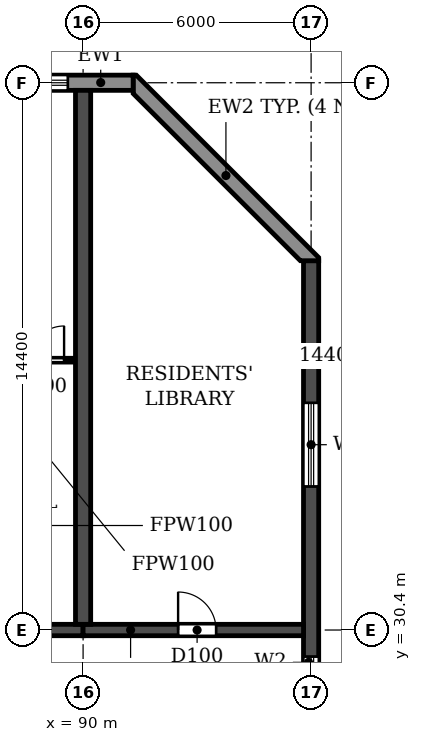
"""IFC4 building model, lengths in metres.
Left out: names, types, materials, properties, quantities, classifications, styles, units other than length and angle.
Written with IfcOpenShell. Run it as: python <this file> out.ifc"""

import sys

from ifc_helpers import new_model, si_unit, direction, frame, frame_2d, origin, place, context, subcontext, project, spatial, polyline, rectangle, outline, extrude, element, fill, save


model = new_model("IFC4")
c1 = context("Model", 3, precision=1e-05, world=origin(), true_north=direction((0.0, 1.0)))
c2 = subcontext(c1, "Body", "Model", "MODEL_VIEW")
j1 = project(units=[si_unit("LENGTHUNIT", "METRE"), si_unit("PLANEANGLEUNIT", "RADIAN")], contexts=[c1])
p1 = place(None, origin())
s1 = spatial("IfcSite", under=j1, at=p1, CompositionType="ELEMENT")
p2 = place(p1, origin())
s2 = spatial("IfcBuilding", under=s1, at=p2, CompositionType="ELEMENT")
p3 = place(p2, frame((0.0, 0.0, 56.4)))
s3 = spatial("IfcBuildingStorey", under=s2, at=p3, CompositionType="ELEMENT", Elevation=56.4)
p4 = place(p3, frame((90.0, 30.55, 0.0), z_axis=(0.0, 0.0, 1.0), x_axis=(0.0, 1.0, 0.0)))
e1 = element("IfcWall", 1, at=p4, inside=s3, PredefinedType="SHEAR", context=c2, shape_type="SweptSolid", body=[
    extrude(rectangle(XDim=14.05, YDim=0.4, at=frame_2d((7.025, 0.0))), origin(), (0.0, 0.0, 1.0), 3.05),
])
p5 = place(p3, frame((96.0, 4.683, 0.0), z_axis=(0.0, 0.0, 1.0), x_axis=(0.0, 1.0, 0.0)))
e2 = element("IfcWall", 2, at=p5, inside=s3, PredefinedType="SHEAR", context=c2, shape_type="SweptSolid", body=[
    extrude(rectangle(XDim=35.434, YDim=0.4, at=frame_2d((17.717, 0.0))), origin(), (0.0, 0.0, 1.0), 3.05),
])
p6 = place(p5, frame((15.917, 0.0, 0.9)))
e3 = element("IfcOpeningElement", 3, at=p6, cuts=e2, PredefinedType="OPENING", context=c2, shape_type="SweptSolid", body=[
    extrude(rectangle(XDim=1.2, YDim=1.5, at=frame_2d((0.6, 0.75))), frame((0.0, 0.21, 0.0), z_axis=(0.0, -1.0, 0.0), x_axis=(1.0, 0.0, 0.0)), (0.0, 0.0, 1.0), 0.42),
])
p7 = place(p5, frame((23.817, 0.0, 0.9)))
e4 = element("IfcOpeningElement", 4, at=p7, cuts=e2, PredefinedType="OPENING", context=c2, shape_type="SweptSolid", body=[
    extrude(rectangle(XDim=1.2, YDim=1.5, at=frame_2d((0.6, 0.75))), frame((0.0, 0.21, 0.0), z_axis=(0.0, -1.0, 0.0), x_axis=(1.0, 0.0, 0.0)), (0.0, 0.0, 1.0), 0.42),
])
p8 = place(p5, frame((8.017, 0.0, 0.9)))
e5 = element("IfcOpeningElement", 5, at=p8, cuts=e2, PredefinedType="OPENING", context=c2, shape_type="SweptSolid", body=[
    extrude(rectangle(XDim=1.2, YDim=1.5, at=frame_2d((0.6, 0.75))), frame((0.0, 0.21, 0.0), z_axis=(0.0, -1.0, 0.0), x_axis=(1.0, 0.0, 0.0)), (0.0, 0.0, 1.0), 0.42),
])
p9 = place(p5, frame((29.493, 0.0, 0.6)))
e6 = element("IfcOpeningElement", 6, at=p9, cuts=e2, PredefinedType="OPENING", context=c2, shape_type="SweptSolid", body=[
    extrude(rectangle(XDim=2.2, YDim=1.8, at=frame_2d((1.1, 0.9))), frame((0.0, 0.21, 0.0), z_axis=(0.0, -1.0, 0.0), x_axis=(1.0, 0.0, 0.0)), (0.0, 0.0, 1.0), 0.42),
])
p10 = place(p5, frame((2.541, 0.0, 0.6)))
e7 = element("IfcOpeningElement", 7, at=p10, cuts=e2, PredefinedType="OPENING", context=c2, shape_type="SweptSolid", body=[
    extrude(rectangle(XDim=2.2, YDim=1.8, at=frame_2d((1.1, 0.9))), frame((0.0, 0.21, 0.0), z_axis=(0.0, -1.0, 0.0), x_axis=(1.0, 0.0, 0.0)), (0.0, 0.0, 1.0), 0.42),
])
p11 = place(p3, frame((84.0, 30.4, 0.0), z_axis=(0.0, 0.0, 1.0), x_axis=(1.0, 0.0, 0.0)))
e8 = element("IfcWall", 8, at=p11, inside=s3, PredefinedType="SHEAR", context=c2, shape_type="SweptSolid", body=[
    extrude(rectangle(XDim=6.0, YDim=0.3, at=frame_2d((3.0, 0.0))), origin(), (0.0, 0.0, 1.0), 2.45),
])
p12 = place(p3, frame((90.0, 30.4, 0.0), z_axis=(0.0, 0.0, 1.0), x_axis=(1.0, 0.0, 0.0)))
e9 = element("IfcWall", 9, at=p12, inside=s3, PredefinedType="SHEAR", context=c2, shape_type="SweptSolid", body=[
    extrude(rectangle(XDim=5.8, YDim=0.3, at=frame_2d((2.9, 0.0))), origin(), (0.0, 0.0, 1.0), 2.45),
])
p13 = place(p12, frame((2.5, 0.0, 0.0)))
e10 = element("IfcOpeningElement", 10, at=p13, cuts=e9, PredefinedType="OPENING", context=c2, shape_type="SweptSolid", body=[
    extrude(rectangle(XDim=1.0, YDim=2.1, at=frame_2d((0.5, 1.05))), frame((0.0, 0.16, 0.0), z_axis=(0.0, -1.0, 0.0), x_axis=(1.0, 0.0, 0.0)), (0.0, 0.0, 1.0), 0.32),
])
p14 = place(p3, origin())
e11 = element("IfcWall", 11, at=p14, inside=s3, PredefinedType="STANDARD", context=c2, shape_type="SweptSolid", body=[
    extrude(outline(polyline([(96.2, 40.117), (96.2, 40.2), (91.4, 45.0), (91.317, 45.0), (91.317, 44.517), (95.717, 40.117), (96.2, 40.117)])), origin(), (0.0, 0.0, 1.0), 3.05),
])
p15 = place(p3, frame((91.317, 44.8, 0.0), z_axis=(0.0, 0.0, 1.0), x_axis=(-1.0, 0.0, 0.0)))
e12 = element("IfcWall", 12, at=p15, inside=s3, PredefinedType="STANDARD", context=c2, shape_type="SweptSolid", body=[
    extrude(rectangle(XDim=80.634, YDim=0.4, at=frame_2d((40.317, 0.0))), origin(), (0.0, 0.0, 1.0), 3.05),
])
p16 = place(p15, frame((76.717, 0.0, 0.9)))
e13 = element("IfcOpeningElement", 13, at=p16, cuts=e12, PredefinedType="OPENING", context=c2, shape_type="SweptSolid", body=[
    extrude(rectangle(XDim=2.2, YDim=1.5, at=frame_2d((1.1, 0.75))), frame((0.0, 0.21, 0.0), z_axis=(0.0, -1.0, 0.0), x_axis=(1.0, 0.0, 0.0)), (0.0, 0.0, 1.0), 0.42),
])
p17 = place(p15, frame((73.917, 0.0, 0.0)))
e14 = element("IfcOpeningElement", 14, at=p17, cuts=e12, PredefinedType="OPENING", context=c2, shape_type="SweptSolid", body=[
    extrude(rectangle(XDim=1.8, YDim=2.4, at=frame_2d((0.9, 1.2))), frame((0.0, 0.21, 0.0), z_axis=(0.0, -1.0, 0.0), x_axis=(1.0, 0.0, 0.0)), (0.0, 0.0, 1.0), 0.42),
])
p18 = place(p15, frame((70.717, 0.0, 0.9)))
e15 = element("IfcOpeningElement", 15, at=p18, cuts=e12, PredefinedType="OPENING", context=c2, shape_type="SweptSolid", body=[
    extrude(rectangle(XDim=2.2, YDim=1.5, at=frame_2d((1.1, 0.75))), frame((0.0, 0.21, 0.0), z_axis=(0.0, -1.0, 0.0), x_axis=(1.0, 0.0, 0.0)), (0.0, 0.0, 1.0), 0.42),
])
p19 = place(p15, frame((67.917, 0.0, 0.0)))
e16 = element("IfcOpeningElement", 16, at=p19, cuts=e12, PredefinedType="OPENING", context=c2, shape_type="SweptSolid", body=[
    extrude(rectangle(XDim=1.8, YDim=2.4, at=frame_2d((0.9, 1.2))), frame((0.0, 0.21, 0.0), z_axis=(0.0, -1.0, 0.0), x_axis=(1.0, 0.0, 0.0)), (0.0, 0.0, 1.0), 0.42),
])
p20 = place(p15, frame((64.717, 0.0, 0.9)))
e17 = element("IfcOpeningElement", 17, at=p20, cuts=e12, PredefinedType="OPENING", context=c2, shape_type="SweptSolid", body=[
    extrude(rectangle(XDim=2.2, YDim=1.5, at=frame_2d((1.1, 0.75))), frame((0.0, 0.21, 0.0), z_axis=(0.0, -1.0, 0.0), x_axis=(1.0, 0.0, 0.0)), (0.0, 0.0, 1.0), 0.42),
])
p21 = place(p15, frame((61.917, 0.0, 0.0)))
e18 = element("IfcOpeningElement", 18, at=p21, cuts=e12, PredefinedType="OPENING", context=c2, shape_type="SweptSolid", body=[
    extrude(rectangle(XDim=1.8, YDim=2.4, at=frame_2d((0.9, 1.2))), frame((0.0, 0.21, 0.0), z_axis=(0.0, -1.0, 0.0), x_axis=(1.0, 0.0, 0.0)), (0.0, 0.0, 1.0), 0.42),
])
p22 = place(p15, frame((58.717, 0.0, 0.9)))
e19 = element("IfcOpeningElement", 19, at=p22, cuts=e12, PredefinedType="OPENING", context=c2, shape_type="SweptSolid", body=[
    extrude(rectangle(XDim=2.2, YDim=1.5, at=frame_2d((1.1, 0.75))), frame((0.0, 0.21, 0.0), z_axis=(0.0, -1.0, 0.0), x_axis=(1.0, 0.0, 0.0)), (0.0, 0.0, 1.0), 0.42),
])
p23 = place(p15, frame((55.717, 0.0, 0.9)))
e20 = element("IfcOpeningElement", 20, at=p23, cuts=e12, PredefinedType="OPENING", context=c2, shape_type="SweptSolid", body=[
    extrude(rectangle(XDim=2.2, YDim=1.5, at=frame_2d((1.1, 0.75))), frame((0.0, 0.21, 0.0), z_axis=(0.0, -1.0, 0.0), x_axis=(1.0, 0.0, 0.0)), (0.0, 0.0, 1.0), 0.42),
])
p24 = place(p15, frame((52.917, 0.0, 0.0)))
e21 = element("IfcOpeningElement", 21, at=p24, cuts=e12, PredefinedType="OPENING", context=c2, shape_type="SweptSolid", body=[
    extrude(rectangle(XDim=1.8, YDim=2.4, at=frame_2d((0.9, 1.2))), frame((0.0, 0.21, 0.0), z_axis=(0.0, -1.0, 0.0), x_axis=(1.0, 0.0, 0.0)), (0.0, 0.0, 1.0), 0.42),
])
p25 = place(p15, frame((49.717, 0.0, 0.9)))
e22 = element("IfcOpeningElement", 22, at=p25, cuts=e12, PredefinedType="OPENING", context=c2, shape_type="SweptSolid", body=[
    extrude(rectangle(XDim=2.2, YDim=1.5, at=frame_2d((1.1, 0.75))), frame((0.0, 0.21, 0.0), z_axis=(0.0, -1.0, 0.0), x_axis=(1.0, 0.0, 0.0)), (0.0, 0.0, 1.0), 0.42),
])
p26 = place(p15, frame((46.917, 0.0, 0.0)))
e23 = element("IfcOpeningElement", 23, at=p26, cuts=e12, PredefinedType="OPENING", context=c2, shape_type="SweptSolid", body=[
    extrude(rectangle(XDim=1.8, YDim=2.4, at=frame_2d((0.9, 1.2))), frame((0.0, 0.21, 0.0), z_axis=(0.0, -1.0, 0.0), x_axis=(1.0, 0.0, 0.0)), (0.0, 0.0, 1.0), 0.42),
])
p27 = place(p15, frame((43.717, 0.0, 0.9)))
e24 = element("IfcOpeningElement", 24, at=p27, cuts=e12, PredefinedType="OPENING", context=c2, shape_type="SweptSolid", body=[
    extrude(rectangle(XDim=2.2, YDim=1.5, at=frame_2d((1.1, 0.75))), frame((0.0, 0.21, 0.0), z_axis=(0.0, -1.0, 0.0), x_axis=(1.0, 0.0, 0.0)), (0.0, 0.0, 1.0), 0.42),
])
p28 = place(p15, frame((40.717, 0.0, 0.9)))
e25 = element("IfcOpeningElement", 25, at=p28, cuts=e12, PredefinedType="OPENING", context=c2, shape_type="SweptSolid", body=[
    extrude(rectangle(XDim=2.2, YDim=1.5, at=frame_2d((1.1, 0.75))), frame((0.0, 0.21, 0.0), z_axis=(0.0, -1.0, 0.0), x_axis=(1.0, 0.0, 0.0)), (0.0, 0.0, 1.0), 0.42),
])
p29 = place(p15, frame((37.717, 0.0, 0.9)))
e26 = element("IfcOpeningElement", 26, at=p29, cuts=e12, PredefinedType="OPENING", context=c2, shape_type="SweptSolid", body=[
    extrude(rectangle(XDim=2.2, YDim=1.5, at=frame_2d((1.1, 0.75))), frame((0.0, 0.21, 0.0), z_axis=(0.0, -1.0, 0.0), x_axis=(1.0, 0.0, 0.0)), (0.0, 0.0, 1.0), 0.42),
])
p30 = place(p15, frame((34.717, 0.0, 0.9)))
e27 = element("IfcOpeningElement", 27, at=p30, cuts=e12, PredefinedType="OPENING", context=c2, shape_type="SweptSolid", body=[
    extrude(rectangle(XDim=2.2, YDim=1.5, at=frame_2d((1.1, 0.75))), frame((0.0, 0.21, 0.0), z_axis=(0.0, -1.0, 0.0), x_axis=(1.0, 0.0, 0.0)), (0.0, 0.0, 1.0), 0.42),
])
p31 = place(p15, frame((31.917, 0.0, 0.0)))
e28 = element("IfcOpeningElement", 28, at=p31, cuts=e12, PredefinedType="OPENING", context=c2, shape_type="SweptSolid", body=[
    extrude(rectangle(XDim=1.8, YDim=2.4, at=frame_2d((0.9, 1.2))), frame((0.0, 0.21, 0.0), z_axis=(0.0, -1.0, 0.0), x_axis=(1.0, 0.0, 0.0)), (0.0, 0.0, 1.0), 0.42),
])
p32 = place(p15, frame((28.917, 0.0, 0.0)))
e29 = element("IfcOpeningElement", 29, at=p32, cuts=e12, PredefinedType="OPENING", context=c2, shape_type="SweptSolid", body=[
    extrude(rectangle(XDim=1.8, YDim=2.4, at=frame_2d((0.9, 1.2))), frame((0.0, 0.21, 0.0), z_axis=(0.0, -1.0, 0.0), x_axis=(1.0, 0.0, 0.0)), (0.0, 0.0, 1.0), 0.42),
])
p33 = place(p15, frame((25.717, 0.0, 0.9)))
e30 = element("IfcOpeningElement", 30, at=p33, cuts=e12, PredefinedType="OPENING", context=c2, shape_type="SweptSolid", body=[
    extrude(rectangle(XDim=2.2, YDim=1.5, at=frame_2d((1.1, 0.75))), frame((0.0, 0.21, 0.0), z_axis=(0.0, -1.0, 0.0), x_axis=(1.0, 0.0, 0.0)), (0.0, 0.0, 1.0), 0.42),
])
p34 = place(p15, frame((22.917, 0.0, 0.0)))
e31 = element("IfcOpeningElement", 31, at=p34, cuts=e12, PredefinedType="OPENING", context=c2, shape_type="SweptSolid", body=[
    extrude(rectangle(XDim=1.8, YDim=2.4, at=frame_2d((0.9, 1.2))), frame((0.0, 0.21, 0.0), z_axis=(0.0, -1.0, 0.0), x_axis=(1.0, 0.0, 0.0)), (0.0, 0.0, 1.0), 0.42),
])
p35 = place(p15, frame((19.717, 0.0, 0.9)))
e32 = element("IfcOpeningElement", 32, at=p35, cuts=e12, PredefinedType="OPENING", context=c2, shape_type="SweptSolid", body=[
    extrude(rectangle(XDim=2.2, YDim=1.5, at=frame_2d((1.1, 0.75))), frame((0.0, 0.21, 0.0), z_axis=(0.0, -1.0, 0.0), x_axis=(1.0, 0.0, 0.0)), (0.0, 0.0, 1.0), 0.42),
])
p36 = place(p15, frame((16.917, 0.0, 0.0)))
e33 = element("IfcOpeningElement", 33, at=p36, cuts=e12, PredefinedType="OPENING", context=c2, shape_type="SweptSolid", body=[
    extrude(rectangle(XDim=1.8, YDim=2.4, at=frame_2d((0.9, 1.2))), frame((0.0, 0.21, 0.0), z_axis=(0.0, -1.0, 0.0), x_axis=(1.0, 0.0, 0.0)), (0.0, 0.0, 1.0), 0.42),
])
p37 = place(p15, frame((13.717, 0.0, 0.9)))
e34 = element("IfcOpeningElement", 34, at=p37, cuts=e12, PredefinedType="OPENING", context=c2, shape_type="SweptSolid", body=[
    extrude(rectangle(XDim=2.2, YDim=1.5, at=frame_2d((1.1, 0.75))), frame((0.0, 0.21, 0.0), z_axis=(0.0, -1.0, 0.0), x_axis=(1.0, 0.0, 0.0)), (0.0, 0.0, 1.0), 0.42),
])
p38 = place(p15, frame((10.917, 0.0, 0.0)))
e35 = element("IfcOpeningElement", 35, at=p38, cuts=e12, PredefinedType="OPENING", context=c2, shape_type="SweptSolid", body=[
    extrude(rectangle(XDim=1.8, YDim=2.4, at=frame_2d((0.9, 1.2))), frame((0.0, 0.21, 0.0), z_axis=(0.0, -1.0, 0.0), x_axis=(1.0, 0.0, 0.0)), (0.0, 0.0, 1.0), 0.42),
])
p39 = place(p15, frame((7.717, 0.0, 0.9)))
e36 = element("IfcOpeningElement", 36, at=p39, cuts=e12, PredefinedType="OPENING", context=c2, shape_type="SweptSolid", body=[
    extrude(rectangle(XDim=2.2, YDim=1.5, at=frame_2d((1.1, 0.75))), frame((0.0, 0.21, 0.0), z_axis=(0.0, -1.0, 0.0), x_axis=(1.0, 0.0, 0.0)), (0.0, 0.0, 1.0), 0.42),
])
p40 = place(p15, frame((4.717, 0.0, 0.9)))
e37 = element("IfcOpeningElement", 37, at=p40, cuts=e12, PredefinedType="OPENING", context=c2, shape_type="SweptSolid", body=[
    extrude(rectangle(XDim=2.2, YDim=1.5, at=frame_2d((1.1, 0.75))), frame((0.0, 0.21, 0.0), z_axis=(0.0, -1.0, 0.0), x_axis=(1.0, 0.0, 0.0)), (0.0, 0.0, 1.0), 0.42),
])
p41 = place(p15, frame((1.717, 0.0, 0.9)))
e38 = element("IfcOpeningElement", 38, at=p41, cuts=e12, PredefinedType="OPENING", context=c2, shape_type="SweptSolid", body=[
    extrude(rectangle(XDim=2.2, YDim=1.5, at=frame_2d((1.1, 0.75))), frame((0.0, 0.21, 0.0), z_axis=(0.0, -1.0, 0.0), x_axis=(1.0, 0.0, 0.0)), (0.0, 0.0, 1.0), 0.42),
])
p42 = place(p3, frame((84.21, 37.5, 0.0), z_axis=(0.0, 0.0, 1.0), x_axis=(1.0, 0.0, 0.0)))
e39 = element("IfcWall", 39, at=p42, inside=s3, PredefinedType="PARTITIONING", context=c2, shape_type="SweptSolid", body=[
    extrude(rectangle(XDim=5.58, YDim=0.1, at=frame_2d((2.79, 0.0))), origin(), (0.0, 0.0, 1.0), 3.05),
])
p43 = place(p42, frame((0.29, 0.0, 0.0)))
e40 = element("IfcOpeningElement", 40, at=p43, cuts=e39, PredefinedType="OPENING", context=c2, shape_type="SweptSolid", body=[
    extrude(rectangle(XDim=0.9, YDim=2.1, at=frame_2d((0.45, 1.05))), frame((0.0, 0.06, 0.0), z_axis=(0.0, -1.0, 0.0), x_axis=(1.0, 0.0, 0.0)), (0.0, 0.0, 1.0), 0.12),
])
p44 = place(p42, frame((4.39, 0.0, 0.0)))
e41 = element("IfcOpeningElement", 41, at=p44, cuts=e39, PredefinedType="OPENING", context=c2, shape_type="SweptSolid", body=[
    extrude(rectangle(XDim=0.9, YDim=2.1, at=frame_2d((0.45, 1.05))), frame((0.0, 0.06, 0.0), z_axis=(0.0, -1.0, 0.0), x_axis=(1.0, 0.0, 0.0)), (0.0, 0.0, 1.0), 0.12),
])
p45 = place(p7, origin())
e42 = element("IfcWindow", 42, at=p45, inside=s3, PartitioningType="SINGLE_PANEL", PredefinedType="WINDOW", context=c2, shape_type="SweptSolid", body=[
    extrude(rectangle(XDim=1.2, YDim=1.5, at=frame_2d((0.6, 0.75))), frame((0.0, 0.03, 0.0), z_axis=(0.0, -1.0, 0.0), x_axis=(1.0, 0.0, 0.0)), (0.0, 0.0, 1.0), 0.06),
])
fill(e4, e42)
p46 = place(p9, origin())
e43 = element("IfcWindow", 43, at=p46, inside=s3, PartitioningType="DOUBLE_PANEL_HORIZONTAL", PredefinedType="WINDOW", context=c2, shape_type="SweptSolid", body=[
    extrude(rectangle(XDim=2.2, YDim=1.8, at=frame_2d((1.1, 0.9))), frame((0.0, 0.03, 0.0), z_axis=(0.0, -1.0, 0.0), x_axis=(1.0, 0.0, 0.0)), (0.0, 0.0, 1.0), 0.06),
])
fill(e6, e43)
p47 = place(p41, origin())
e44 = element("IfcWindow", 44, at=p47, inside=s3, PartitioningType="DOUBLE_PANEL_HORIZONTAL", PredefinedType="WINDOW", context=c2, shape_type="SweptSolid", body=[
    extrude(rectangle(XDim=2.2, YDim=1.5, at=frame_2d((1.1, 0.75))), frame((0.0, 0.03, 0.0), z_axis=(0.0, -1.0, 0.0), x_axis=(1.0, 0.0, 0.0)), (0.0, 0.0, 1.0), 0.06),
])
fill(e38, e44)
p48 = place(p44, origin())
e45 = element("IfcDoor", 45, at=p48, inside=s3, OperationType="SINGLE_SWING_RIGHT", PredefinedType="DOOR", context=c2, shape_type="SweptSolid", body=[
    extrude(rectangle(XDim=0.9, YDim=2.1, at=frame_2d((0.45, 1.05))), frame((0.0, 0.025, 0.0), z_axis=(0.0, -1.0, 0.0), x_axis=(1.0, 0.0, 0.0)), (0.0, 0.0, 1.0), 0.05),
])
fill(e41, e45)
p49 = place(p13, origin())
e46 = element("IfcDoor", 46, at=p49, inside=s3, OperationType="SINGLE_SWING_LEFT", PredefinedType="DOOR", context=c2, shape_type="SweptSolid", body=[
    extrude(rectangle(XDim=1.0, YDim=2.1, at=frame_2d((0.5, 1.05))), frame((0.0, 0.025, 0.0), z_axis=(0.0, -1.0, 0.0), x_axis=(1.0, 0.0, 0.0)), (0.0, 0.0, 1.0), 0.05),
])
fill(e10, e46)
save(model, sys.argv[1])
